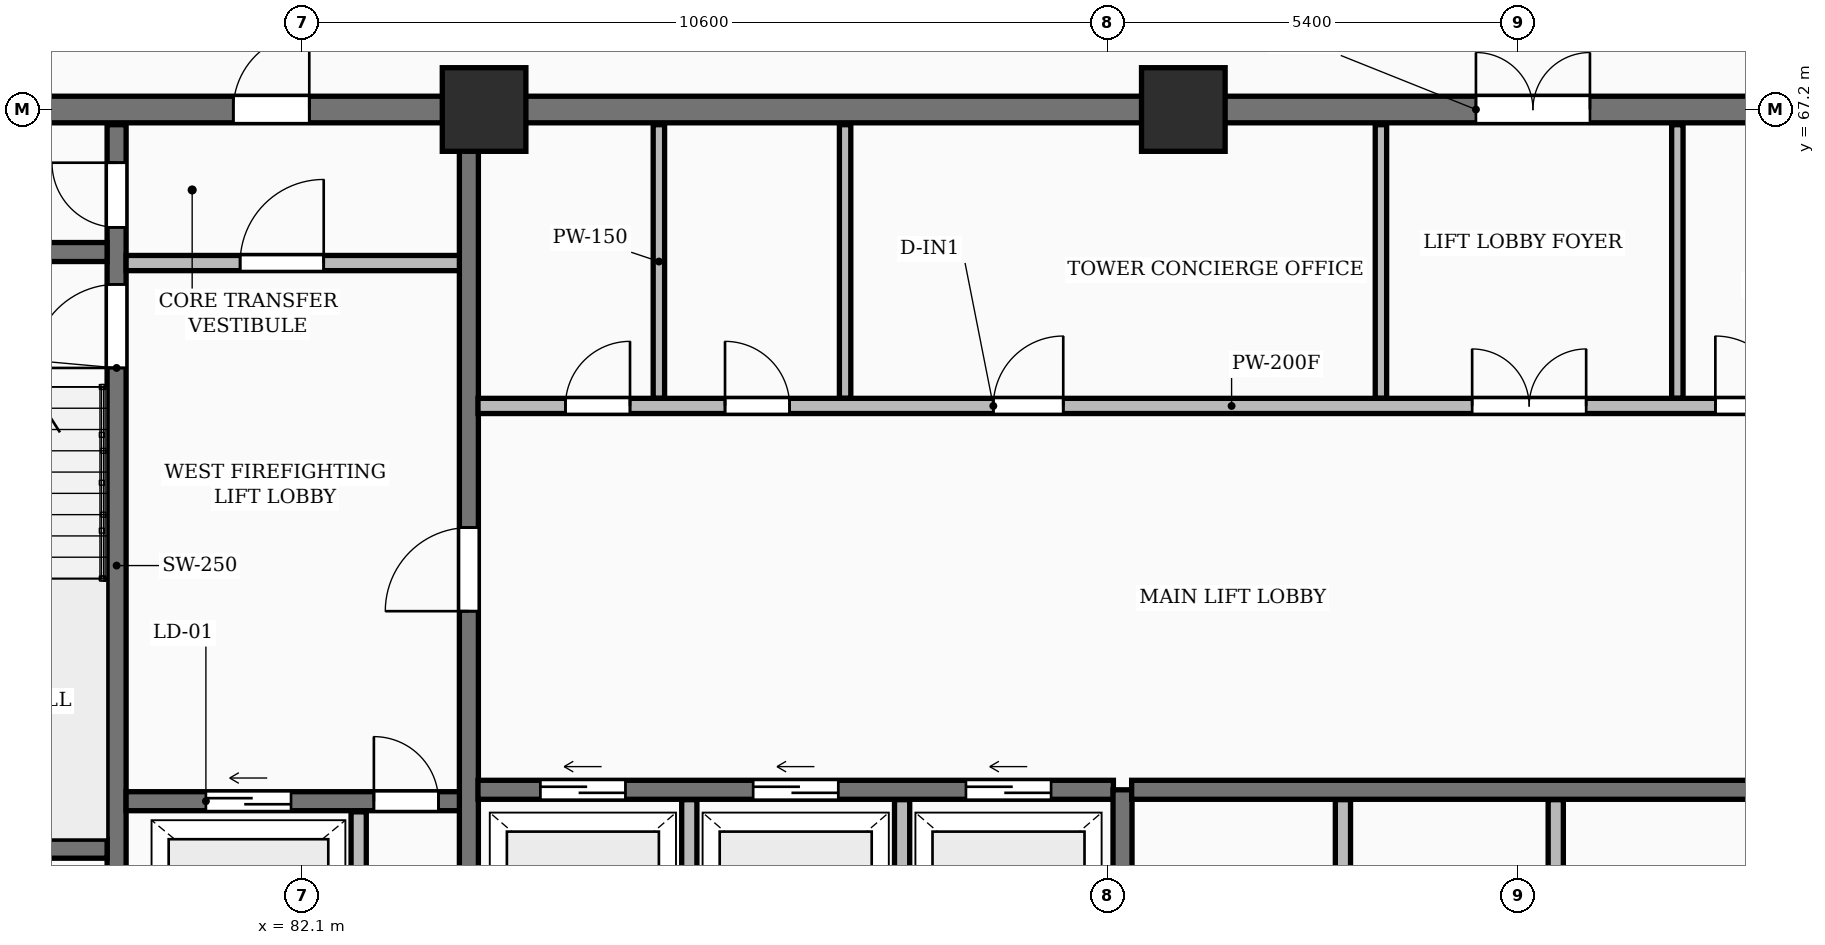
"""IFC4 building model, lengths in metres.
Left out: names, types, materials, properties, quantities, classifications, styles, units other than length and angle.
Written with IfcOpenShell. Run it as: python <this file> out.ifc"""

import sys

from ifc_helpers import new_model, si_unit, direction, frame, frame_2d, origin, origin_2d, place, context, subcontext, project, spatial, rectangle, extrude, element, fill, save


model = new_model("IFC4")
c1 = context("Model", 3, precision=1e-05, world=origin(), true_north=direction((0.0, 1.0)))
c2 = subcontext(c1, "Body", "Model", "MODEL_VIEW")
j1 = project(units=[si_unit("LENGTHUNIT", "METRE"), si_unit("PLANEANGLEUNIT", "RADIAN")], contexts=[c1])
p1 = place(None, origin())
s1 = spatial("IfcSite", under=j1, at=p1, CompositionType="ELEMENT")
p2 = place(p1, origin())
s2 = spatial("IfcBuilding", under=s1, at=p2, CompositionType="ELEMENT")
p3 = place(p2, frame((0.0, 0.0, -10.8)))
s3 = spatial("IfcBuildingStorey", under=s2, at=p3, CompositionType="ELEMENT", Elevation=-10.8)
for number, where, z_axis, x_axis in (
    (1, (84.5, 67.2, -0.45), (0.0, 0.0, 1.0), (1.0, 0.0, 0.0)),
    (2, (93.7, 67.2, -0.45), (0.0, 0.0, 1.0), (1.0, 0.0, 0.0)),
):
    element("IfcColumn", number, at=place(p3, frame(where, z_axis=z_axis, x_axis=x_axis)), inside=s3, PredefinedType="COLUMN", context=c2, shape_type="SweptSolid", body=[
        extrude(rectangle(XDim=1.1, YDim=1.1, at=origin_2d()), origin(), (0.0, 0.0, 1.0), 4.05),
    ])
p4 = place(p3, frame((75.95, 67.2, 0.0), z_axis=(0.0, 0.0, 1.0), x_axis=(1.0, 0.0, 0.0)))
e3 = element("IfcWall", 3, at=p4, inside=s3, PredefinedType="SHEAR", context=c2, shape_type="SweptSolid", body=[
    extrude(rectangle(XDim=36.3, YDim=0.35, at=frame_2d((18.15, 0.0))), origin(), (0.0, 0.0, 1.0), 3.6),
])
p5 = place(p4, frame((5.25, 0.0, 0.0)))
e4 = element("IfcOpeningElement", 4, at=p5, cuts=e3, PredefinedType="OPENING", context=c2, shape_type="SweptSolid", body=[
    extrude(rectangle(XDim=1.0, YDim=2.15, at=frame_2d((0.5, 1.075))), frame((0.0, 0.185, 0.0), z_axis=(0.0, -1.0, 0.0), x_axis=(1.0, 0.0, 0.0)), (0.0, 0.0, 1.0), 0.37),
])
p6 = place(p4, frame((21.6, 0.0, 0.0)))
e5 = element("IfcOpeningElement", 5, at=p6, cuts=e3, PredefinedType="OPENING", context=c2, shape_type="SweptSolid", body=[
    extrude(rectangle(XDim=1.5, YDim=2.2, at=frame_2d((0.75, 1.1))), frame((0.0, 0.185, 0.0), z_axis=(0.0, -1.0, 0.0), x_axis=(1.0, 0.0, 0.0)), (0.0, 0.0, 1.0), 0.37),
])
p7 = place(p4, frame((30.45, 0.0, 0.0)))
e6 = element("IfcOpeningElement", 6, at=p7, cuts=e3, PredefinedType="OPENING", context=c2, shape_type="SweptSolid", body=[
    extrude(rectangle(XDim=1.0, YDim=2.15, at=frame_2d((0.5, 1.075))), frame((0.0, 0.185, 0.0), z_axis=(0.0, -1.0, 0.0), x_axis=(1.0, 0.0, 0.0)), (0.0, 0.0, 1.0), 0.37),
])
p8 = place(p3, frame((79.665, 55.4, 0.0), z_axis=(0.0, 0.0, 1.0), x_axis=(0.0, 1.0, 0.0)))
e7 = element("IfcWall", 7, at=p8, inside=s3, PredefinedType="SHEAR", context=c2, shape_type="SweptSolid", body=[
    extrude(rectangle(XDim=11.6, YDim=0.25, at=frame_2d((5.8, 0.0))), origin(), (0.0, 0.0, 1.0), 3.6),
])
p9 = place(p8, frame((0.55, 0.0, 0.0)))
e8 = element("IfcOpeningElement", 8, at=p9, cuts=e7, PredefinedType="OPENING", context=c2, shape_type="SweptSolid", body=[
    extrude(rectangle(XDim=0.85, YDim=2.05, at=frame_2d((0.425, 1.025))), frame((0.0, 0.135, 0.0), z_axis=(0.0, -1.0, 0.0), x_axis=(1.0, 0.0, 0.0)), (0.0, 0.0, 1.0), 0.27),
])
p10 = place(p8, frame((8.4, 0.0, 0.0)))
e9 = element("IfcOpeningElement", 9, at=p10, cuts=e7, PredefinedType="OPENING", context=c2, shape_type="SweptSolid", body=[
    extrude(rectangle(XDim=1.1, YDim=2.1, at=frame_2d((0.55, 1.05))), frame((0.0, 0.135, 0.0), z_axis=(0.0, -1.0, 0.0), x_axis=(1.0, 0.0, 0.0)), (0.0, 0.0, 1.0), 0.27),
])
p11 = place(p8, frame((10.25, 0.0, 0.0)))
e10 = element("IfcOpeningElement", 10, at=p11, cuts=e7, PredefinedType="OPENING", context=c2, shape_type="SweptSolid", body=[
    extrude(rectangle(XDim=0.85, YDim=2.05, at=frame_2d((0.425, 1.025))), frame((0.0, 0.135, 0.0), z_axis=(0.0, -1.0, 0.0), x_axis=(1.0, 0.0, 0.0)), (0.0, 0.0, 1.0), 0.27),
])
for number, where, z_axis, x_axis in (
    (11, (76.3, 57.475, 0.0), (0.0, 0.0, 1.0), (1.0, 0.0, 0.0)),
    (12, (76.3, 65.325, 0.0), (0.0, 0.0, 1.0), (1.0, 0.0, 0.0)),
):
    element("IfcWall", number, at=place(p3, frame(where, z_axis=z_axis, x_axis=x_axis)), inside=s3, PredefinedType="SHEAR", context=c2, shape_type="SweptSolid", body=[
        extrude(rectangle(XDim=3.24, YDim=0.25, at=frame_2d((1.62, 0.0))), origin(), (0.0, 0.0, 1.0), 3.6),
    ])
p12 = place(p3, frame((79.79, 58.1, 0.0), z_axis=(0.0, 0.0, 1.0), x_axis=(1.0, 0.0, 0.0)))
e13 = element("IfcWall", 13, at=p12, inside=s3, PredefinedType="SHEAR", context=c2, shape_type="SweptSolid", body=[
    extrude(rectangle(XDim=4.39, YDim=0.25, at=frame_2d((2.195, 0.0))), origin(), (0.0, 0.0, 1.0), 3.6),
])
p13 = place(p12, frame((1.05, 0.0, 0.0)))
e14 = element("IfcOpeningElement", 14, at=p13, cuts=e13, PredefinedType="OPENING", context=c2, shape_type="SweptSolid", body=[
    extrude(rectangle(XDim=1.12, YDim=2.12, at=frame_2d((0.56, 1.06))), frame((0.0, 0.135, 0.0), z_axis=(0.0, -1.0, 0.0), x_axis=(1.0, 0.0, 0.0)), (0.0, 0.0, 1.0), 0.27),
])
p14 = place(p12, frame((3.26, 0.0, 0.0)))
e15 = element("IfcOpeningElement", 15, at=p14, cuts=e13, PredefinedType="OPENING", context=c2, shape_type="SweptSolid", body=[
    extrude(rectangle(XDim=0.85, YDim=2.05, at=frame_2d((0.425, 1.025))), frame((0.0, 0.135, 0.0), z_axis=(0.0, -1.0, 0.0), x_axis=(1.0, 0.0, 0.0)), (0.0, 0.0, 1.0), 0.27),
])
p15 = place(p3, frame((82.85, 55.4, 0.0), z_axis=(0.0, 0.0, 1.0), x_axis=(0.0, 1.0, 0.0)))
e16 = element("IfcWall", 16, at=p15, inside=s3, PredefinedType="PARTITIONING", context=c2, shape_type="SweptSolid", body=[
    extrude(rectangle(XDim=2.56, YDim=0.2, at=frame_2d((1.28, 0.0))), origin(), (0.0, 0.0, 1.0), 3.3),
])
p16 = place(p3, frame((79.79, 65.18, 0.0), z_axis=(0.0, 0.0, 1.0), x_axis=(1.0, 0.0, 0.0)))
e17 = element("IfcWall", 17, at=p16, inside=s3, PredefinedType="PARTITIONING", context=c2, shape_type="SweptSolid", body=[
    extrude(rectangle(XDim=4.39, YDim=0.2, at=frame_2d((2.195, 0.0))), origin(), (0.0, 0.0, 1.0), 3.3),
])
p17 = place(p16, frame((1.5, 0.0, 0.0)))
e18 = element("IfcOpeningElement", 18, at=p17, cuts=e17, PredefinedType="OPENING", context=c2, shape_type="SweptSolid", body=[
    extrude(rectangle(XDim=1.1, YDim=2.1, at=frame_2d((0.55, 1.05))), frame((0.0, 0.11, 0.0), z_axis=(0.0, -1.0, 0.0), x_axis=(1.0, 0.0, 0.0)), (0.0, 0.0, 1.0), 0.22),
])
p18 = place(p3, frame((84.3, 55.4, 0.0), z_axis=(0.0, 0.0, 1.0), x_axis=(0.0, 1.0, 0.0)))
e19 = element("IfcWall", 19, at=p18, inside=s3, PredefinedType="SHEAR", context=c2, shape_type="SweptSolid", body=[
    extrude(rectangle(XDim=11.6, YDim=0.25, at=frame_2d((5.8, 0.0))), origin(), (0.0, 0.0, 1.0), 3.6),
])
p19 = place(p18, frame((5.2, 0.0, 0.0)))
e20 = element("IfcOpeningElement", 20, at=p19, cuts=e19, PredefinedType="OPENING", context=c2, shape_type="SweptSolid", body=[
    extrude(rectangle(XDim=1.1, YDim=2.1, at=frame_2d((0.55, 1.05))), frame((0.0, 0.135, 0.0), z_axis=(0.0, -1.0, 0.0), x_axis=(1.0, 0.0, 0.0)), (0.0, 0.0, 1.0), 0.27),
])
for number, where, z_axis, x_axis in (
    (21, (87.2, 55.4, 0.0), (0.0, 0.0, 1.0), (0.0, 1.0, 0.0)),
    (22, (90.0, 55.4, 0.0), (0.0, 0.0, 1.0), (0.0, 1.0, 0.0)),
):
    element("IfcWall", number, at=place(p3, frame(where, z_axis=z_axis, x_axis=x_axis)), inside=s3, PredefinedType="PARTITIONING", context=c2, shape_type="SweptSolid", body=[
        extrude(rectangle(XDim=2.72, YDim=0.2, at=frame_2d((1.36, 0.0))), origin(), (0.0, 0.0, 1.0), 3.3),
    ])
p20 = place(p3, frame((84.42, 58.25, 0.0), z_axis=(0.0, 0.0, 1.0), x_axis=(1.0, 0.0, 0.0)))
e23 = element("IfcWall", 23, at=p20, inside=s3, PredefinedType="SHEAR", context=c2, shape_type="SweptSolid", body=[
    extrude(rectangle(XDim=8.36, YDim=0.25, at=frame_2d((4.18, 0.0))), origin(), (0.0, 0.0, 1.0), 3.6),
])
p21 = place(p20, frame((0.82, 0.0, 0.0)))
e24 = element("IfcOpeningElement", 24, at=p21, cuts=e23, PredefinedType="OPENING", context=c2, shape_type="SweptSolid", body=[
    extrude(rectangle(XDim=1.12, YDim=2.12, at=frame_2d((0.56, 1.06))), frame((0.0, 0.135, 0.0), z_axis=(0.0, -1.0, 0.0), x_axis=(1.0, 0.0, 0.0)), (0.0, 0.0, 1.0), 0.27),
])
p22 = place(p20, frame((3.62, 0.0, 0.0)))
e25 = element("IfcOpeningElement", 25, at=p22, cuts=e23, PredefinedType="OPENING", context=c2, shape_type="SweptSolid", body=[
    extrude(rectangle(XDim=1.12, YDim=2.12, at=frame_2d((0.56, 1.06))), frame((0.0, 0.135, 0.0), z_axis=(0.0, -1.0, 0.0), x_axis=(1.0, 0.0, 0.0)), (0.0, 0.0, 1.0), 0.27),
])
p23 = place(p20, frame((6.42, 0.0, 0.0)))
e26 = element("IfcOpeningElement", 26, at=p23, cuts=e23, PredefinedType="OPENING", context=c2, shape_type="SweptSolid", body=[
    extrude(rectangle(XDim=1.12, YDim=2.12, at=frame_2d((0.56, 1.06))), frame((0.0, 0.135, 0.0), z_axis=(0.0, -1.0, 0.0), x_axis=(1.0, 0.0, 0.0)), (0.0, 0.0, 1.0), 0.27),
])
p24 = place(p3, frame((92.9, 55.4, 0.0), z_axis=(0.0, 0.0, 1.0), x_axis=(0.0, 1.0, 0.0)))
e27 = element("IfcWall", 27, at=p24, inside=s3, PredefinedType="SHEAR", context=c2, shape_type="SweptSolid", body=[
    extrude(rectangle(XDim=2.85, YDim=0.25, at=frame_2d((1.425, 0.0))), origin(), (0.0, 0.0, 1.0), 3.6),
])
for number, where, z_axis, x_axis in (
    (28, (95.8, 55.4, 0.0), (0.0, 0.0, 1.0), (0.0, 1.0, 0.0)),
    (29, (98.6, 55.4, 0.0), (0.0, 0.0, 1.0), (0.0, 1.0, 0.0)),
):
    element("IfcWall", number, at=place(p3, frame(where, z_axis=z_axis, x_axis=x_axis)), inside=s3, PredefinedType="PARTITIONING", context=c2, shape_type="SweptSolid", body=[
        extrude(rectangle(XDim=2.72, YDim=0.2, at=frame_2d((1.36, 0.0))), origin(), (0.0, 0.0, 1.0), 3.3),
    ])
p25 = place(p3, frame((93.02, 58.25, 0.0), z_axis=(0.0, 0.0, 1.0), x_axis=(1.0, 0.0, 0.0)))
e30 = element("IfcWall", 30, at=p25, inside=s3, PredefinedType="SHEAR", context=c2, shape_type="SweptSolid", body=[
    extrude(rectangle(XDim=8.36, YDim=0.25, at=frame_2d((4.18, 0.0))), origin(), (0.0, 0.0, 1.0), 3.6),
])
for number, where, z_axis, x_axis in (
    (31, (86.8, 63.4, 0.0), (0.0, 0.0, 1.0), (0.0, 1.0, 0.0)),
    (32, (89.25, 63.4, 0.0), (0.0, 0.0, 1.0), (0.0, 1.0, 0.0)),
    (33, (96.3, 63.4, 0.0), (0.0, 0.0, 1.0), (0.0, 1.0, 0.0)),
    (34, (100.2, 63.4, 0.0), (0.0, 0.0, 1.0), (0.0, 1.0, 0.0)),
):
    element("IfcWall", number, at=place(p3, frame(where, z_axis=z_axis, x_axis=x_axis)), inside=s3, PredefinedType="PARTITIONING", context=c2, shape_type="SweptSolid", body=[
        extrude(rectangle(XDim=3.6, YDim=0.15, at=frame_2d((1.8, 0.0))), origin(), (0.0, 0.0, 1.0), 3.3),
    ])
p26 = place(p3, frame((84.42, 63.3, 0.0), z_axis=(0.0, 0.0, 1.0), x_axis=(1.0, 0.0, 0.0)))
e35 = element("IfcWall", 35, at=p26, inside=s3, PredefinedType="PARTITIONING", context=c2, shape_type="SweptSolid", body=[
    extrude(rectangle(XDim=19.83, YDim=0.2, at=frame_2d((9.915, 0.0))), origin(), (0.0, 0.0, 1.0), 3.3),
])
p27 = place(p26, frame((1.15, 0.0, 0.0)))
e36 = element("IfcOpeningElement", 36, at=p27, cuts=e35, PredefinedType="OPENING", context=c2, shape_type="SweptSolid", body=[
    extrude(rectangle(XDim=0.85, YDim=2.05, at=frame_2d((0.425, 1.025))), frame((0.0, 0.11, 0.0), z_axis=(0.0, -1.0, 0.0), x_axis=(1.0, 0.0, 0.0)), (0.0, 0.0, 1.0), 0.22),
])
p28 = place(p26, frame((3.25, 0.0, 0.0)))
e37 = element("IfcOpeningElement", 37, at=p28, cuts=e35, PredefinedType="OPENING", context=c2, shape_type="SweptSolid", body=[
    extrude(rectangle(XDim=0.85, YDim=2.05, at=frame_2d((0.425, 1.025))), frame((0.0, 0.11, 0.0), z_axis=(0.0, -1.0, 0.0), x_axis=(1.0, 0.0, 0.0)), (0.0, 0.0, 1.0), 0.22),
])
p29 = place(p26, frame((13.08, 0.0, 0.0)))
e38 = element("IfcOpeningElement", 38, at=p29, cuts=e35, PredefinedType="OPENING", context=c2, shape_type="SweptSolid", body=[
    extrude(rectangle(XDim=1.5, YDim=2.2, at=frame_2d((0.75, 1.1))), frame((0.0, 0.11, 0.0), z_axis=(0.0, -1.0, 0.0), x_axis=(1.0, 0.0, 0.0)), (0.0, 0.0, 1.0), 0.22),
])
p30 = place(p26, frame((6.78, 0.0, 0.0)))
e39 = element("IfcOpeningElement", 39, at=p30, cuts=e35, PredefinedType="OPENING", context=c2, shape_type="SweptSolid", body=[
    extrude(rectangle(XDim=0.92, YDim=2.08, at=frame_2d((0.46, 1.04))), frame((0.0, 0.11, 0.0), z_axis=(0.0, -1.0, 0.0), x_axis=(1.0, 0.0, 0.0)), (0.0, 0.0, 1.0), 0.22),
])
p31 = place(p26, frame((16.28, 0.0, 0.0)))
e40 = element("IfcOpeningElement", 40, at=p31, cuts=e35, PredefinedType="OPENING", context=c2, shape_type="SweptSolid", body=[
    extrude(rectangle(XDim=0.92, YDim=2.08, at=frame_2d((0.46, 1.04))), frame((0.0, 0.11, 0.0), z_axis=(0.0, -1.0, 0.0), x_axis=(1.0, 0.0, 0.0)), (0.0, 0.0, 1.0), 0.22),
])
p32 = place(p5, origin())
e41 = element("IfcDoor", 41, at=p32, inside=s3, OperationType="SINGLE_SWING_RIGHT", PredefinedType="DOOR", context=c2, shape_type="SweptSolid", body=[
    extrude(rectangle(XDim=1.0, YDim=2.15, at=frame_2d((0.5, 1.075))), frame((0.0, 0.025, 0.0), z_axis=(0.0, -1.0, 0.0), x_axis=(1.0, 0.0, 0.0)), (0.0, 0.0, 1.0), 0.05),
])
fill(e4, e41)
p33 = place(p6, origin())
e42 = element("IfcDoor", 42, at=p33, inside=s3, OperationType="DOUBLE_DOOR_SINGLE_SWING", PredefinedType="DOOR", context=c2, shape_type="SweptSolid", body=[
    extrude(rectangle(XDim=1.5, YDim=2.2, at=frame_2d((0.75, 1.1))), frame((0.0, 0.025, 0.0), z_axis=(0.0, -1.0, 0.0), x_axis=(1.0, 0.0, 0.0)), (0.0, 0.0, 1.0), 0.05),
])
fill(e5, e42)
p34 = place(p10, origin())
e43 = element("IfcDoor", 43, at=p34, inside=s3, OperationType="SINGLE_SWING_LEFT", PredefinedType="DOOR", context=c2, shape_type="SweptSolid", body=[
    extrude(rectangle(XDim=1.1, YDim=2.1, at=frame_2d((0.55, 1.05))), frame((0.0, 0.025, 0.0), z_axis=(0.0, -1.0, 0.0), x_axis=(1.0, 0.0, 0.0)), (0.0, 0.0, 1.0), 0.05),
])
fill(e9, e43)
p35 = place(p11, origin())
e44 = element("IfcDoor", 44, at=p35, inside=s3, OperationType="SINGLE_SWING_RIGHT", PredefinedType="DOOR", context=c2, shape_type="SweptSolid", body=[
    extrude(rectangle(XDim=0.85, YDim=2.05, at=frame_2d((0.425, 1.025))), frame((0.0, 0.025, 0.0), z_axis=(0.0, -1.0, 0.0), x_axis=(1.0, 0.0, 0.0)), (0.0, 0.0, 1.0), 0.05),
])
fill(e10, e44)
p36 = place(p13, origin())
e45 = element("IfcDoor", 45, at=p36, inside=s3, OperationType="SLIDING_TO_LEFT", PredefinedType="DOOR", context=c2, shape_type="SweptSolid", body=[
    extrude(rectangle(XDim=1.12, YDim=2.12, at=frame_2d((0.56, 1.06))), frame((0.0, 0.025, 0.0), z_axis=(0.0, -1.0, 0.0), x_axis=(1.0, 0.0, 0.0)), (0.0, 0.0, 1.0), 0.05),
])
fill(e14, e45)
p37 = place(p14, origin())
e46 = element("IfcDoor", 46, at=p37, inside=s3, OperationType="SINGLE_SWING_LEFT", PredefinedType="DOOR", context=c2, shape_type="SweptSolid", body=[
    extrude(rectangle(XDim=0.85, YDim=2.05, at=frame_2d((0.425, 1.025))), frame((0.0, 0.025, 0.0), z_axis=(0.0, -1.0, 0.0), x_axis=(1.0, 0.0, 0.0)), (0.0, 0.0, 1.0), 0.05),
])
fill(e15, e46)
p38 = place(p17, origin())
e47 = element("IfcDoor", 47, at=p38, inside=s3, OperationType="SINGLE_SWING_RIGHT", PredefinedType="DOOR", context=c2, shape_type="SweptSolid", body=[
    extrude(rectangle(XDim=1.1, YDim=2.1, at=frame_2d((0.55, 1.05))), frame((0.0, 0.025, 0.0), z_axis=(0.0, -1.0, 0.0), x_axis=(1.0, 0.0, 0.0)), (0.0, 0.0, 1.0), 0.05),
])
fill(e18, e47)
p39 = place(p19, origin())
e48 = element("IfcDoor", 48, at=p39, inside=s3, OperationType="SINGLE_SWING_LEFT", PredefinedType="DOOR", context=c2, shape_type="SweptSolid", body=[
    extrude(rectangle(XDim=1.1, YDim=2.1, at=frame_2d((0.55, 1.05))), frame((0.0, 0.025, 0.0), z_axis=(0.0, -1.0, 0.0), x_axis=(1.0, 0.0, 0.0)), (0.0, 0.0, 1.0), 0.05),
])
fill(e20, e48)
p40 = place(p21, origin())
e49 = element("IfcDoor", 49, at=p40, inside=s3, OperationType="SLIDING_TO_LEFT", PredefinedType="DOOR", context=c2, shape_type="SweptSolid", body=[
    extrude(rectangle(XDim=1.12, YDim=2.12, at=frame_2d((0.56, 1.06))), frame((0.0, 0.025, 0.0), z_axis=(0.0, -1.0, 0.0), x_axis=(1.0, 0.0, 0.0)), (0.0, 0.0, 1.0), 0.05),
])
fill(e24, e49)
p41 = place(p22, origin())
e50 = element("IfcDoor", 50, at=p41, inside=s3, OperationType="SLIDING_TO_LEFT", PredefinedType="DOOR", context=c2, shape_type="SweptSolid", body=[
    extrude(rectangle(XDim=1.12, YDim=2.12, at=frame_2d((0.56, 1.06))), frame((0.0, 0.025, 0.0), z_axis=(0.0, -1.0, 0.0), x_axis=(1.0, 0.0, 0.0)), (0.0, 0.0, 1.0), 0.05),
])
fill(e25, e50)
p42 = place(p23, origin())
e51 = element("IfcDoor", 51, at=p42, inside=s3, OperationType="SLIDING_TO_LEFT", PredefinedType="DOOR", context=c2, shape_type="SweptSolid", body=[
    extrude(rectangle(XDim=1.12, YDim=2.12, at=frame_2d((0.56, 1.06))), frame((0.0, 0.025, 0.0), z_axis=(0.0, -1.0, 0.0), x_axis=(1.0, 0.0, 0.0)), (0.0, 0.0, 1.0), 0.05),
])
fill(e26, e51)
p43 = place(p27, origin())
e52 = element("IfcDoor", 52, at=p43, inside=s3, OperationType="SINGLE_SWING_RIGHT", PredefinedType="DOOR", context=c2, shape_type="SweptSolid", body=[
    extrude(rectangle(XDim=0.85, YDim=2.05, at=frame_2d((0.425, 1.025))), frame((0.0, 0.025, 0.0), z_axis=(0.0, -1.0, 0.0), x_axis=(1.0, 0.0, 0.0)), (0.0, 0.0, 1.0), 0.05),
])
fill(e36, e52)
p44 = place(p28, origin())
e53 = element("IfcDoor", 53, at=p44, inside=s3, OperationType="SINGLE_SWING_LEFT", PredefinedType="DOOR", context=c2, shape_type="SweptSolid", body=[
    extrude(rectangle(XDim=0.85, YDim=2.05, at=frame_2d((0.425, 1.025))), frame((0.0, 0.025, 0.0), z_axis=(0.0, -1.0, 0.0), x_axis=(1.0, 0.0, 0.0)), (0.0, 0.0, 1.0), 0.05),
])
fill(e37, e53)
p45 = place(p29, origin())
e54 = element("IfcDoor", 54, at=p45, inside=s3, OperationType="DOUBLE_DOOR_SINGLE_SWING", PredefinedType="DOOR", context=c2, shape_type="SweptSolid", body=[
    extrude(rectangle(XDim=1.5, YDim=2.2, at=frame_2d((0.75, 1.1))), frame((0.0, 0.025, 0.0), z_axis=(0.0, -1.0, 0.0), x_axis=(1.0, 0.0, 0.0)), (0.0, 0.0, 1.0), 0.05),
])
fill(e38, e54)
p46 = place(p30, origin())
e55 = element("IfcDoor", 55, at=p46, inside=s3, OperationType="SINGLE_SWING_RIGHT", PredefinedType="DOOR", context=c2, shape_type="SweptSolid", body=[
    extrude(rectangle(XDim=0.92, YDim=2.08, at=frame_2d((0.46, 1.04))), frame((0.0, 0.025, 0.0), z_axis=(0.0, -1.0, 0.0), x_axis=(1.0, 0.0, 0.0)), (0.0, 0.0, 1.0), 0.05),
])
fill(e39, e55)
p47 = place(p31, origin())
e56 = element("IfcDoor", 56, at=p47, inside=s3, OperationType="SINGLE_SWING_LEFT", PredefinedType="DOOR", context=c2, shape_type="SweptSolid", body=[
    extrude(rectangle(XDim=0.92, YDim=2.08, at=frame_2d((0.46, 1.04))), frame((0.0, 0.025, 0.0), z_axis=(0.0, -1.0, 0.0), x_axis=(1.0, 0.0, 0.0)), (0.0, 0.0, 1.0), 0.05),
])
fill(e40, e56)
save(model, sys.argv[1])
